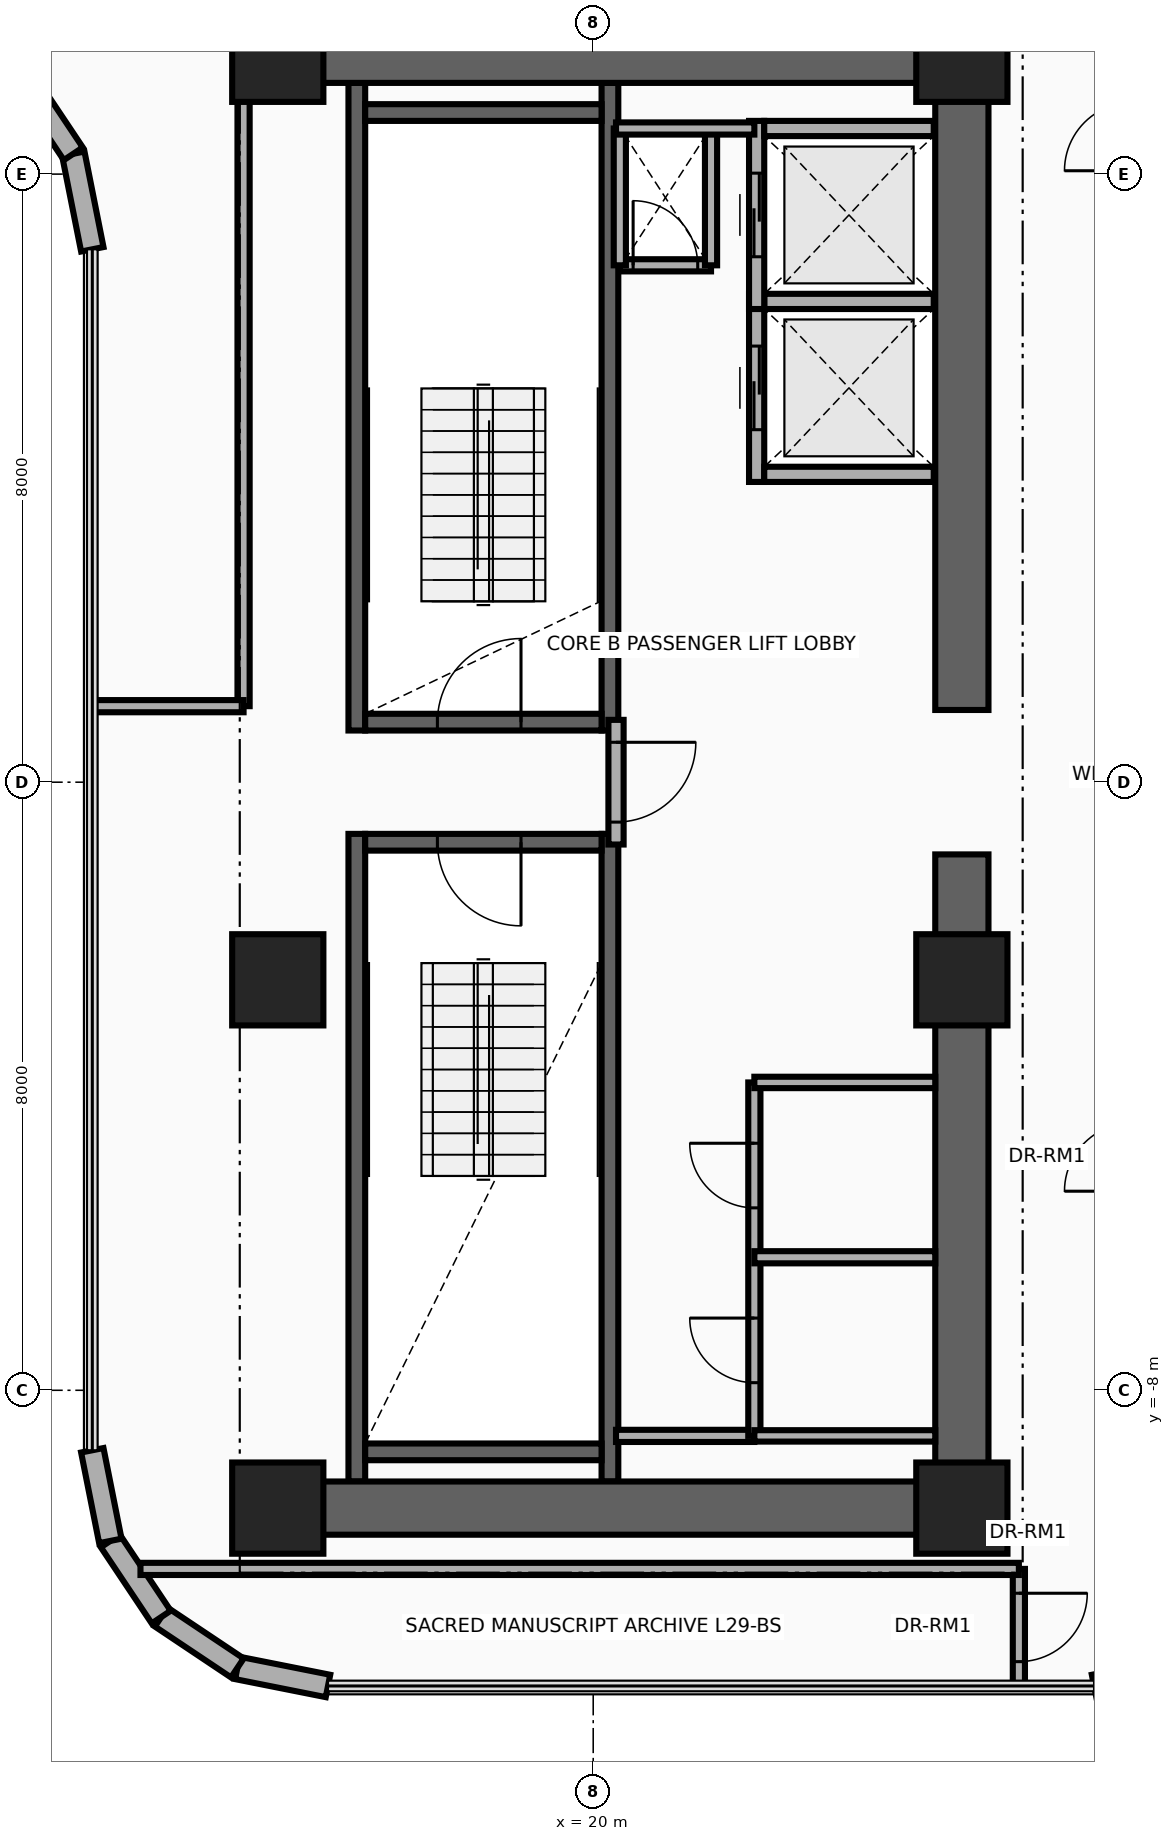
"""IFC4 building model, lengths in metres.
Left out: names, types, materials, properties, quantities, classifications, styles, units other than length and angle.
Written with IfcOpenShell. Run it as: python <this file> out.ifc"""

import sys

from ifc_helpers import new_model, si_unit, direction, frame, frame_2d, origin, origin_2d, place, context, subcontext, project, spatial, rectangle, extrude, source, transform, mapped, element, fill, save


model = new_model("IFC4")
c1 = context("Model", 3, precision=1e-05, world=origin(), true_north=direction((0.0, 1.0)))
c2 = subcontext(c1, "Body", "Model", "MODEL_VIEW")
j1 = project(units=[si_unit("LENGTHUNIT", "METRE"), si_unit("PLANEANGLEUNIT", "RADIAN")], contexts=[c1])
p1 = place(None, origin())
s1 = spatial("IfcSite", under=j1, at=p1, CompositionType="ELEMENT")
p2 = place(p1, origin())
s2 = spatial("IfcBuilding", under=s1, at=p2, CompositionType="ELEMENT")
p3 = place(p2, frame((0.0, 0.0, 116.8)))
s3 = spatial("IfcBuildingStorey", under=s2, at=p3, CompositionType="ELEMENT", Elevation=116.8)
for number, where, z_axis, x_axis in (
    (1, (16.89, 0.68, 0.0), (0.0, 0.0, 1.0), (0.0, 1.0, 0.0)),
    (2, (20.22, 0.68, 0.0), (0.0, 0.0, 1.0), (0.0, 1.0, 0.0)),
):
    element("IfcWall", number, at=place(p3, frame(where, z_axis=z_axis, x_axis=x_axis)), inside=s3, PredefinedType="SHEAR", context=c2, shape_type="SweptSolid", body=[
        extrude(rectangle(XDim=8.52, YDim=0.22, at=frame_2d((4.26, 0.0))), origin(), (0.0, 0.0, 1.0), 3.46),
    ])
p4 = place(p3, frame((17.0, 0.79, 0.0), z_axis=(0.0, 0.0, 1.0), x_axis=(1.0, 0.0, 0.0)))
e3 = element("IfcWall", 3, at=p4, inside=s3, PredefinedType="SHEAR", context=c2, shape_type="SweptSolid", body=[
    extrude(rectangle(XDim=3.11, YDim=0.22, at=frame_2d((1.555, 0.0))), origin(), (0.0, 0.0, 1.0), 3.46),
])
p5 = place(p4, frame((0.95, 0.0, 0.0)))
e4 = element("IfcOpeningElement", 4, at=p5, cuts=e3, PredefinedType="OPENING", context=c2, shape_type="SweptSolid", body=[
    extrude(rectangle(XDim=1.1, YDim=2.15, at=frame_2d((0.55, 1.075))), frame((0.0, 0.125, 0.0), z_axis=(0.0, -1.0, 0.0), x_axis=(1.0, 0.0, 0.0)), (0.0, 0.0, 1.0), 0.25),
])
p6 = place(p3, frame((17.0, 8.81, 0.0), z_axis=(0.0, 0.0, 1.0), x_axis=(1.0, 0.0, 0.0)))
e5 = element("IfcWall", 5, at=p6, inside=s3, PredefinedType="SHEAR", context=c2, shape_type="SweptSolid", body=[
    extrude(rectangle(XDim=3.11, YDim=0.22, at=frame_2d((1.555, 0.0))), origin(), (0.0, 0.0, 1.0), 3.46),
])
for number, where, z_axis, x_axis in (
    (6, (16.89, -9.2, 0.0), (0.0, 0.0, 1.0), (0.0, 1.0, 0.0)),
    (7, (20.22, -9.2, 0.0), (0.0, 0.0, 1.0), (0.0, 1.0, 0.0)),
):
    element("IfcWall", number, at=place(p3, frame(where, z_axis=z_axis, x_axis=x_axis)), inside=s3, PredefinedType="SHEAR", context=c2, shape_type="SweptSolid", body=[
        extrude(rectangle(XDim=8.52, YDim=0.22, at=frame_2d((4.26, 0.0))), origin(), (0.0, 0.0, 1.0), 3.46),
    ])
p7 = place(p3, frame((17.0, -8.81, 0.0), z_axis=(0.0, 0.0, 1.0), x_axis=(1.0, 0.0, 0.0)))
e8 = element("IfcWall", 8, at=p7, inside=s3, PredefinedType="SHEAR", context=c2, shape_type="SweptSolid", body=[
    extrude(rectangle(XDim=3.11, YDim=0.22, at=frame_2d((1.555, 0.0))), origin(), (0.0, 0.0, 1.0), 3.46),
])
p8 = place(p3, frame((17.0, -0.79, 0.0), z_axis=(0.0, 0.0, 1.0), x_axis=(1.0, 0.0, 0.0)))
e9 = element("IfcWall", 9, at=p8, inside=s3, PredefinedType="SHEAR", context=c2, shape_type="SweptSolid", body=[
    extrude(rectangle(XDim=3.11, YDim=0.22, at=frame_2d((1.555, 0.0))), origin(), (0.0, 0.0, 1.0), 3.46),
])
p9 = place(p8, frame((0.95, 0.0, 0.0)))
e10 = element("IfcOpeningElement", 10, at=p9, cuts=e9, PredefinedType="OPENING", context=c2, shape_type="SweptSolid", body=[
    extrude(rectangle(XDim=1.1, YDim=2.15, at=frame_2d((0.55, 1.075))), frame((0.0, 0.125, 0.0), z_axis=(0.0, -1.0, 0.0), x_axis=(1.0, 0.0, 0.0)), (0.0, 0.0, 1.0), 0.25),
])
for number, where, z_axis, x_axis in (
    (11, (24.85, -9.9, 0.0), (0.0, 0.0, 1.0), (0.0, 1.0, 0.0)),
    (12, (24.85, 0.95, 0.0), (0.0, 0.0, 1.0), (0.0, 1.0, 0.0)),
):
    element("IfcWall", number, at=place(p3, frame(where, z_axis=z_axis, x_axis=x_axis)), inside=s3, PredefinedType="SHEAR", context=c2, shape_type="SweptSolid", body=[
        extrude(rectangle(XDim=8.95, YDim=0.7, at=frame_2d((4.475, 0.0))), origin(), (0.0, 0.0, 1.0), 3.46),
    ])
for number, where, z_axis, x_axis in (
    (13, (15.85, 9.55, 0.0), (0.0, 0.0, 1.0), (1.0, 0.0, 0.0)),
    (14, (15.85, -9.55, 0.0), (0.0, 0.0, 1.0), (1.0, 0.0, 0.0)),
):
    element("IfcWall", number, at=place(p3, frame(where, z_axis=z_axis, x_axis=x_axis)), inside=s3, PredefinedType="SHEAR", context=c2, shape_type="SweptSolid", body=[
        extrude(rectangle(XDim=9.0, YDim=0.7, at=frame_2d((4.5, 0.0))), origin(), (0.0, 0.0, 1.0), 3.46),
    ])
m1 = source(origin(), c2, "Body", "SweptSolid", [
    extrude(rectangle(XDim=1.2, YDim=1.2, at=origin_2d()), origin(), (0.0, 0.0, 1.0), 3.7),
])
for number, where, z_axis, x_axis in (
    (15, (15.85, -9.55, 0.0), (0.0, 0.0, 1.0), (1.0, 0.0, 0.0)),
    (16, (24.85, -9.55, 0.0), (0.0, 0.0, 1.0), (1.0, 0.0, 0.0)),
    (17, (15.85, -2.6, 0.0), (0.0, 0.0, 1.0), (1.0, 0.0, 0.0)),
    (18, (24.85, -2.6, 0.0), (0.0, 0.0, 1.0), (1.0, 0.0, 0.0)),
    (19, (15.85, 9.55, 0.0), (0.0, 0.0, 1.0), (1.0, 0.0, 0.0)),
    (20, (24.85, 9.55, 0.0), (0.0, 0.0, 1.0), (1.0, 0.0, 0.0)),
):
    element("IfcColumn", number, at=place(p3, frame(where, z_axis=z_axis, x_axis=x_axis)), inside=s3, PredefinedType="COLUMN", context=c2, shape_type="MappedRepresentation", body=[
        mapped(m1, transform((0.0, 0.0, 0.0), x_axis=(1.0, 0.0, 0.0), y_axis=(0.0, 1.0, 0.0), z_axis=(0.0, 0.0, 1.0), scale=1.0)),
    ])
p10 = place(p3, frame((27.782, -11.653, 0.0), z_axis=(0.0, 0.0, 1.0), x_axis=(-0.980811661072, -0.194957650543, 0.0)))
e21 = element("IfcWall", 21, at=p10, inside=s3, PredefinedType="SOLIDWALL", context=c2, shape_type="SweptSolid", body=[
    extrude(rectangle(XDim=1.216, YDim=0.3, at=frame_2d((0.608, 0.0))), origin(), (0.0, 0.0, 1.0), 3.46),
])
p11 = place(p3, frame((16.511, -11.89, 0.0), z_axis=(0.0, 0.0, 1.0), x_axis=(-0.980804027463, 0.194996050505, 0.0)))
e22 = element("IfcWall", 22, at=p11, inside=s3, PredefinedType="SOLIDWALL", context=c2, shape_type="SweptSolid", body=[
    extrude(rectangle(XDim=1.216, YDim=0.3, at=frame_2d((0.608, 0.0))), origin(), (0.0, 0.0, 1.0), 3.46),
])
for number, where, z_axis, x_axis in (
    (23, (15.318, -11.653, 0.0), (0.0, 0.0, 1.0), (-0.831, 0.556, 0.0)),
    (24, (14.317, -10.983, 0.0), (0.0, 0.0, 1.0), (-0.556, 0.831, 0.0)),
):
    element("IfcWall", number, at=place(p3, frame(where, z_axis=z_axis, x_axis=x_axis)), inside=s3, PredefinedType="SOLIDWALL", context=c2, shape_type="SweptSolid", body=[
        extrude(rectangle(XDim=1.205, YDim=0.3, at=frame_2d((0.603, 0.0))), origin(), (0.0, 0.0, 1.0), 3.46),
    ])
p12 = place(p3, frame((13.647, -9.982, 0.0), z_axis=(0.0, 0.0, 1.0), x_axis=(-0.195189223115, 0.980765602568, 0.0)))
e25 = element("IfcWall", 25, at=p12, inside=s3, PredefinedType="SOLIDWALL", context=c2, shape_type="SweptSolid", body=[
    extrude(rectangle(XDim=1.216, YDim=0.3, at=frame_2d((0.608, 0.0))), origin(), (0.0, 0.0, 1.0), 3.46),
])
p13 = place(p3, frame((13.41, 7.011, 0.0), z_axis=(0.0, 0.0, 1.0), x_axis=(-0.195090163074, 0.980785312019, 0.0)))
e26 = element("IfcWall", 26, at=p13, inside=s3, PredefinedType="SOLIDWALL", context=c2, shape_type="SweptSolid", body=[
    extrude(rectangle(XDim=1.281, YDim=0.3, at=frame_2d((0.641, 0.0))), origin(), (0.0, 0.0, 1.0), 3.46),
])
p14 = place(p3, frame((13.16, 8.268, 0.0), z_axis=(0.0, 0.0, 1.0), x_axis=(-0.555615398575, 0.831439431869, 0.0)))
e27 = element("IfcWall", 27, at=p14, inside=s3, PredefinedType="SOLIDWALL", context=c2, shape_type="SweptSolid", body=[
    extrude(rectangle(XDim=1.292, YDim=0.3, at=frame_2d((0.646, 0.0))), origin(), (0.0, 0.0, 1.0), 3.46),
])
p15 = place(p3, frame((22.15, 3.95, 0.0), z_axis=(0.0, 0.0, 1.0), x_axis=(0.0, 1.0, 0.0)))
e28 = element("IfcWall", 28, at=p15, inside=s3, PredefinedType="MOVABLE", context=c2, shape_type="SweptSolid", body=[
    extrude(rectangle(XDim=2.475, YDim=0.2, at=frame_2d((1.238, 0.0))), origin(), (0.0, 0.0, 1.0), 3.46),
])
p16 = place(p15, frame((0.688, 0.0, 0.0)))
e29 = element("IfcOpeningElement", 29, at=p16, cuts=e28, PredefinedType="OPENING", context=c2, shape_type="SweptSolid", body=[
    extrude(rectangle(XDim=1.1, YDim=2.1, at=frame_2d((0.55, 1.05))), frame((0.0, 0.115, 0.0), z_axis=(0.0, -1.0, 0.0), x_axis=(1.0, 0.0, 0.0)), (0.0, 0.0, 1.0), 0.23),
])
for number, where, z_axis, x_axis in (
    (30, (22.25, 4.05, 0.0), (0.0, 0.0, 1.0), (1.0, 0.0, 0.0)),
    (31, (22.25, 6.325, 0.0), (0.0, 0.0, 1.0), (1.0, 0.0, 0.0)),
):
    element("IfcWall", number, at=place(p3, frame(where, z_axis=z_axis, x_axis=x_axis)), inside=s3, PredefinedType="MOVABLE", context=c2, shape_type="SweptSolid", body=[
        extrude(rectangle(XDim=2.23, YDim=0.2, at=frame_2d((1.115, 0.0))), origin(), (0.0, 0.0, 1.0), 2.245),
    ])
p17 = place(p3, frame((22.15, 6.225, 0.0), z_axis=(0.0, 0.0, 1.0), x_axis=(0.0, 1.0, 0.0)))
e32 = element("IfcWall", 32, at=p17, inside=s3, PredefinedType="MOVABLE", context=c2, shape_type="SweptSolid", body=[
    extrude(rectangle(XDim=2.475, YDim=0.2, at=frame_2d((1.237, 0.0))), origin(), (0.0, 0.0, 1.0), 3.46),
])
p18 = place(p17, frame((0.688, 0.0, 0.0)))
e33 = element("IfcOpeningElement", 33, at=p18, cuts=e32, PredefinedType="OPENING", context=c2, shape_type="SweptSolid", body=[
    extrude(rectangle(XDim=1.1, YDim=2.1, at=frame_2d((0.55, 1.05))), frame((0.0, 0.115, 0.0), z_axis=(0.0, -1.0, 0.0), x_axis=(1.0, 0.0, 0.0)), (0.0, 0.0, 1.0), 0.23),
])
p19 = place(p3, frame((22.25, 8.6, 0.0), z_axis=(0.0, 0.0, 1.0), x_axis=(1.0, 0.0, 0.0)))
e34 = element("IfcWall", 34, at=p19, inside=s3, PredefinedType="MOVABLE", context=c2, shape_type="SweptSolid", body=[
    extrude(rectangle(XDim=2.23, YDim=0.2, at=frame_2d((1.115, 0.0))), origin(), (0.0, 0.0, 1.0), 2.245),
])
p20 = place(p3, frame((20.3, -0.82, 0.0), z_axis=(0.0, 0.0, 1.0), x_axis=(0.0, 1.0, 0.0)))
e35 = element("IfcWall", 35, at=p20, inside=s3, PredefinedType="PARTITIONING", context=c2, shape_type="SweptSolid", body=[
    extrude(rectangle(XDim=1.64, YDim=0.2, at=frame_2d((0.82, 0.0))), origin(), (0.0, 0.0, 1.0), 3.46),
])
p21 = place(p20, frame((0.295, 0.0, 0.0)))
e36 = element("IfcOpeningElement", 36, at=p21, cuts=e35, PredefinedType="OPENING", context=c2, shape_type="SweptSolid", body=[
    extrude(rectangle(XDim=1.05, YDim=2.15, at=frame_2d((0.525, 1.075))), frame((0.0, 0.115, 0.0), z_axis=(0.0, -1.0, 0.0), x_axis=(1.0, 0.0, 0.0)), (0.0, 0.0, 1.0), 0.23),
])
p22 = place(p3, frame((20.35, 6.8, 0.0), z_axis=(0.0, 0.0, 1.0), x_axis=(1.0, 0.0, 0.0)))
e37 = element("IfcWall", 37, at=p22, inside=s3, PredefinedType="PARTITIONING", context=c2, shape_type="SweptSolid", body=[
    extrude(rectangle(XDim=1.2, YDim=0.16, at=frame_2d((0.6, 0.0))), origin(), (0.0, 0.0, 1.0), 3.46),
])
p23 = place(p22, frame((0.175, 0.0, 0.0)))
e38 = element("IfcOpeningElement", 38, at=p23, cuts=e37, PredefinedType="OPENING", context=c2, shape_type="SweptSolid", body=[
    extrude(rectangle(XDim=0.85, YDim=2.05, at=frame_2d((0.425, 1.025))), frame((0.0, 0.095, 0.0), z_axis=(0.0, -1.0, 0.0), x_axis=(1.0, 0.0, 0.0)), (0.0, 0.0, 1.0), 0.19),
])
for number, where, z_axis, x_axis in (
    (39, (21.55, 6.8, 0.0), (0.0, 0.0, 1.0), (0.0, 1.0, 0.0)),
    (40, (20.35, 6.8, 0.0), (0.0, 0.0, 1.0), (0.0, 1.0, 0.0)),
):
    element("IfcWall", number, at=place(p3, frame(where, z_axis=z_axis, x_axis=x_axis)), inside=s3, PredefinedType="PARTITIONING", context=c2, shape_type="SweptSolid", body=[
        extrude(rectangle(XDim=1.8, YDim=0.16, at=frame_2d((0.9, 0.0))), origin(), (0.0, 0.0, 1.0), 3.46),
    ])
for number, where, z_axis, x_axis in (
    (41, (20.3, -8.6, 0.0), (0.0, 0.0, 1.0), (1.0, 0.0, 0.0)),
    (42, (20.3, 8.6, 0.0), (0.0, 0.0, 1.0), (1.0, 0.0, 0.0)),
):
    element("IfcWall", number, at=place(p3, frame(where, z_axis=z_axis, x_axis=x_axis)), inside=s3, PredefinedType="PARTITIONING", context=c2, shape_type="SweptSolid", body=[
        extrude(rectangle(XDim=1.82, YDim=0.16, at=frame_2d((0.91, 0.0))), origin(), (0.0, 0.0, 1.0), 3.46),
    ])
p24 = place(p3, frame((22.12, -8.6, 0.0), z_axis=(0.0, 0.0, 1.0), x_axis=(0.0, 1.0, 0.0)))
e43 = element("IfcWall", 43, at=p24, inside=s3, PredefinedType="PARTITIONING", context=c2, shape_type="SweptSolid", body=[
    extrude(rectangle(XDim=4.65, YDim=0.16, at=frame_2d((2.325, 0.0))), origin(), (0.0, 0.0, 1.0), 3.46),
])
p25 = place(p24, frame((0.7, 0.0, 0.0)))
e44 = element("IfcOpeningElement", 44, at=p25, cuts=e43, PredefinedType="OPENING", context=c2, shape_type="SweptSolid", body=[
    extrude(rectangle(XDim=0.85, YDim=2.05, at=frame_2d((0.425, 1.025))), frame((0.0, 0.095, 0.0), z_axis=(0.0, -1.0, 0.0), x_axis=(1.0, 0.0, 0.0)), (0.0, 0.0, 1.0), 0.19),
])
p26 = place(p24, frame((3.0, 0.0, 0.0)))
e45 = element("IfcOpeningElement", 45, at=p26, cuts=e43, PredefinedType="OPENING", context=c2, shape_type="SweptSolid", body=[
    extrude(rectangle(XDim=0.85, YDim=2.05, at=frame_2d((0.425, 1.025))), frame((0.0, 0.095, 0.0), z_axis=(0.0, -1.0, 0.0), x_axis=(1.0, 0.0, 0.0)), (0.0, 0.0, 1.0), 0.19),
])
for number, where, z_axis, x_axis in (
    (46, (22.12, -3.95, 0.0), (0.0, 0.0, 1.0), (1.0, 0.0, 0.0)),
    (47, (22.12, -8.6, 0.0), (0.0, 0.0, 1.0), (1.0, 0.0, 0.0)),
):
    element("IfcWall", number, at=place(p3, frame(where, z_axis=z_axis, x_axis=x_axis)), inside=s3, PredefinedType="PARTITIONING", context=c2, shape_type="SweptSolid", body=[
        extrude(rectangle(XDim=2.38, YDim=0.15, at=frame_2d((1.19, 0.0))), origin(), (0.0, 0.0, 1.0), 3.46),
    ])
p27 = place(p3, frame((22.12, -6.25, 0.0), z_axis=(0.0, 0.0, 1.0), x_axis=(1.0, 0.0, 0.0)))
e48 = element("IfcWall", 48, at=p27, inside=s3, PredefinedType="PARTITIONING", context=c2, shape_type="SweptSolid", body=[
    extrude(rectangle(XDim=2.38, YDim=0.16, at=frame_2d((1.19, 0.0))), origin(), (0.0, 0.0, 1.0), 3.46),
])
p28 = place(p3, frame((25.6, -11.89, 0.0), z_axis=(0.0, 0.0, 1.0), x_axis=(0.0, 1.0, 0.0)))
e49 = element("IfcWall", 49, at=p28, inside=s3, PredefinedType="PARTITIONING", context=c2, shape_type="SweptSolid", body=[
    extrude(rectangle(XDim=1.54, YDim=0.16, at=frame_2d((0.77, 0.0))), origin(), (0.0, 0.0, 1.0), 3.46),
])
p29 = place(p28, frame((0.32, 0.0, 0.0)))
e50 = element("IfcOpeningElement", 50, at=p29, cuts=e49, PredefinedType="OPENING", context=c2, shape_type="SweptSolid", body=[
    extrude(rectangle(XDim=0.9, YDim=2.1, at=frame_2d((0.45, 1.05))), frame((0.0, 0.095, 0.0), z_axis=(0.0, -1.0, 0.0), x_axis=(1.0, 0.0, 0.0)), (0.0, 0.0, 1.0), 0.19),
])
p30 = place(p3, frame((14.044, -10.35, 0.0), z_axis=(0.0, 0.0, 1.0), x_axis=(1.0, 0.0, 0.0)))
e51 = element("IfcWall", 51, at=p30, inside=s3, PredefinedType="PARTITIONING", context=c2, shape_type="SweptSolid", body=[
    extrude(rectangle(XDim=11.556, YDim=0.16, at=frame_2d((5.778, 0.0))), origin(), (0.0, 0.0, 1.0), 3.46),
])
p31 = place(p3, frame((15.4, 1.0, 0.0), z_axis=(0.0, 0.0, 1.0), x_axis=(0.0, 1.0, 0.0)))
e52 = element("IfcWall", 52, at=p31, inside=s3, PredefinedType="PARTITIONING", context=c2, shape_type="SweptSolid", body=[
    extrude(rectangle(XDim=9.35, YDim=0.16, at=frame_2d((4.675, 0.0))), origin(), (0.0, 0.0, 1.0), 2.245),
])
p32 = place(p3, frame((13.41, 1.0, 0.0), z_axis=(0.0, 0.0, 1.0), x_axis=(1.0, 0.0, 0.0)))
e53 = element("IfcWall", 53, at=p32, inside=s3, PredefinedType="PARTITIONING", context=c2, shape_type="SweptSolid", body=[
    extrude(rectangle(XDim=1.99, YDim=0.16, at=frame_2d((0.995, 0.0))), origin(), (0.0, 0.0, 1.0), 2.245),
])
p33 = place(p16, origin())
e54 = element("IfcDoor", 54, at=p33, inside=s3, OperationType="DOUBLE_DOOR_SLIDING", PredefinedType="DOOR", context=c2, shape_type="SweptSolid", body=[
    extrude(rectangle(XDim=1.1, YDim=2.1, at=frame_2d((0.55, 1.05))), frame((0.0, 0.025, 0.0), z_axis=(0.0, -1.0, 0.0), x_axis=(1.0, 0.0, 0.0)), (0.0, 0.0, 1.0), 0.05),
])
fill(e29, e54)
p34 = place(p18, origin())
e55 = element("IfcDoor", 55, at=p34, inside=s3, OperationType="DOUBLE_DOOR_SLIDING", PredefinedType="DOOR", context=c2, shape_type="SweptSolid", body=[
    extrude(rectangle(XDim=1.1, YDim=2.1, at=frame_2d((0.55, 1.05))), frame((0.0, 0.025, 0.0), z_axis=(0.0, -1.0, 0.0), x_axis=(1.0, 0.0, 0.0)), (0.0, 0.0, 1.0), 0.05),
])
fill(e33, e55)
p35 = place(p21, frame((1.05, 0.0, 0.0), z_axis=(0.0, 0.0, 1.0), x_axis=(-1.0, 0.0, 0.0)))
e56 = element("IfcDoor", 56, at=p35, inside=s3, OperationType="SINGLE_SWING_LEFT", PredefinedType="DOOR", context=c2, shape_type="SweptSolid", body=[
    extrude(rectangle(XDim=1.05, YDim=2.15, at=frame_2d((0.525, 1.075))), frame((0.0, 0.025, 0.0), z_axis=(0.0, -1.0, 0.0), x_axis=(1.0, 0.0, 0.0)), (0.0, 0.0, 1.0), 0.05),
])
fill(e36, e56)
p36 = place(p5, origin())
e57 = element("IfcDoor", 57, at=p36, inside=s3, OperationType="SINGLE_SWING_RIGHT", PredefinedType="DOOR", context=c2, shape_type="SweptSolid", body=[
    extrude(rectangle(XDim=1.1, YDim=2.15, at=frame_2d((0.55, 1.075))), frame((0.0, 0.025, 0.0), z_axis=(0.0, -1.0, 0.0), x_axis=(1.0, 0.0, 0.0)), (0.0, 0.0, 1.0), 0.05),
])
fill(e4, e57)
p37 = place(p9, frame((1.1, 0.0, 0.0), z_axis=(0.0, 0.0, 1.0), x_axis=(-1.0, 0.0, 0.0)))
e58 = element("IfcDoor", 58, at=p37, inside=s3, OperationType="SINGLE_SWING_LEFT", PredefinedType="DOOR", context=c2, shape_type="SweptSolid", body=[
    extrude(rectangle(XDim=1.1, YDim=2.15, at=frame_2d((0.55, 1.075))), frame((0.0, 0.025, 0.0), z_axis=(0.0, -1.0, 0.0), x_axis=(1.0, 0.0, 0.0)), (0.0, 0.0, 1.0), 0.05),
])
fill(e10, e58)
p38 = place(p23, origin())
e59 = element("IfcDoor", 59, at=p38, inside=s3, OperationType="SINGLE_SWING_RIGHT", PredefinedType="DOOR", context=c2, shape_type="SweptSolid", body=[
    extrude(rectangle(XDim=0.85, YDim=2.05, at=frame_2d((0.425, 1.025))), frame((0.0, 0.025, 0.0), z_axis=(0.0, -1.0, 0.0), x_axis=(1.0, 0.0, 0.0)), (0.0, 0.0, 1.0), 0.05),
])
fill(e38, e59)
p39 = place(p25, origin())
e60 = element("IfcDoor", 60, at=p39, inside=s3, OperationType="SINGLE_SWING_LEFT", PredefinedType="DOOR", context=c2, shape_type="SweptSolid", body=[
    extrude(rectangle(XDim=0.85, YDim=2.05, at=frame_2d((0.425, 1.025))), frame((0.0, 0.025, 0.0), z_axis=(0.0, -1.0, 0.0), x_axis=(1.0, 0.0, 0.0)), (0.0, 0.0, 1.0), 0.05),
])
fill(e44, e60)
p40 = place(p26, origin())
e61 = element("IfcDoor", 61, at=p40, inside=s3, OperationType="SINGLE_SWING_RIGHT", PredefinedType="DOOR", context=c2, shape_type="SweptSolid", body=[
    extrude(rectangle(XDim=0.85, YDim=2.05, at=frame_2d((0.425, 1.025))), frame((0.0, 0.025, 0.0), z_axis=(0.0, -1.0, 0.0), x_axis=(1.0, 0.0, 0.0)), (0.0, 0.0, 1.0), 0.05),
])
fill(e45, e61)
p41 = place(p29, frame((0.9, 0.0, 0.0), z_axis=(0.0, 0.0, 1.0), x_axis=(-1.0, 0.0, 0.0)))
e62 = element("IfcDoor", 62, at=p41, inside=s3, OperationType="SINGLE_SWING_LEFT", PredefinedType="DOOR", context=c2, shape_type="SweptSolid", body=[
    extrude(rectangle(XDim=0.9, YDim=2.1, at=frame_2d((0.45, 1.05))), frame((0.0, 0.025, 0.0), z_axis=(0.0, -1.0, 0.0), x_axis=(1.0, 0.0, 0.0)), (0.0, 0.0, 1.0), 0.05),
])
fill(e50, e62)
save(model, sys.argv[1])
